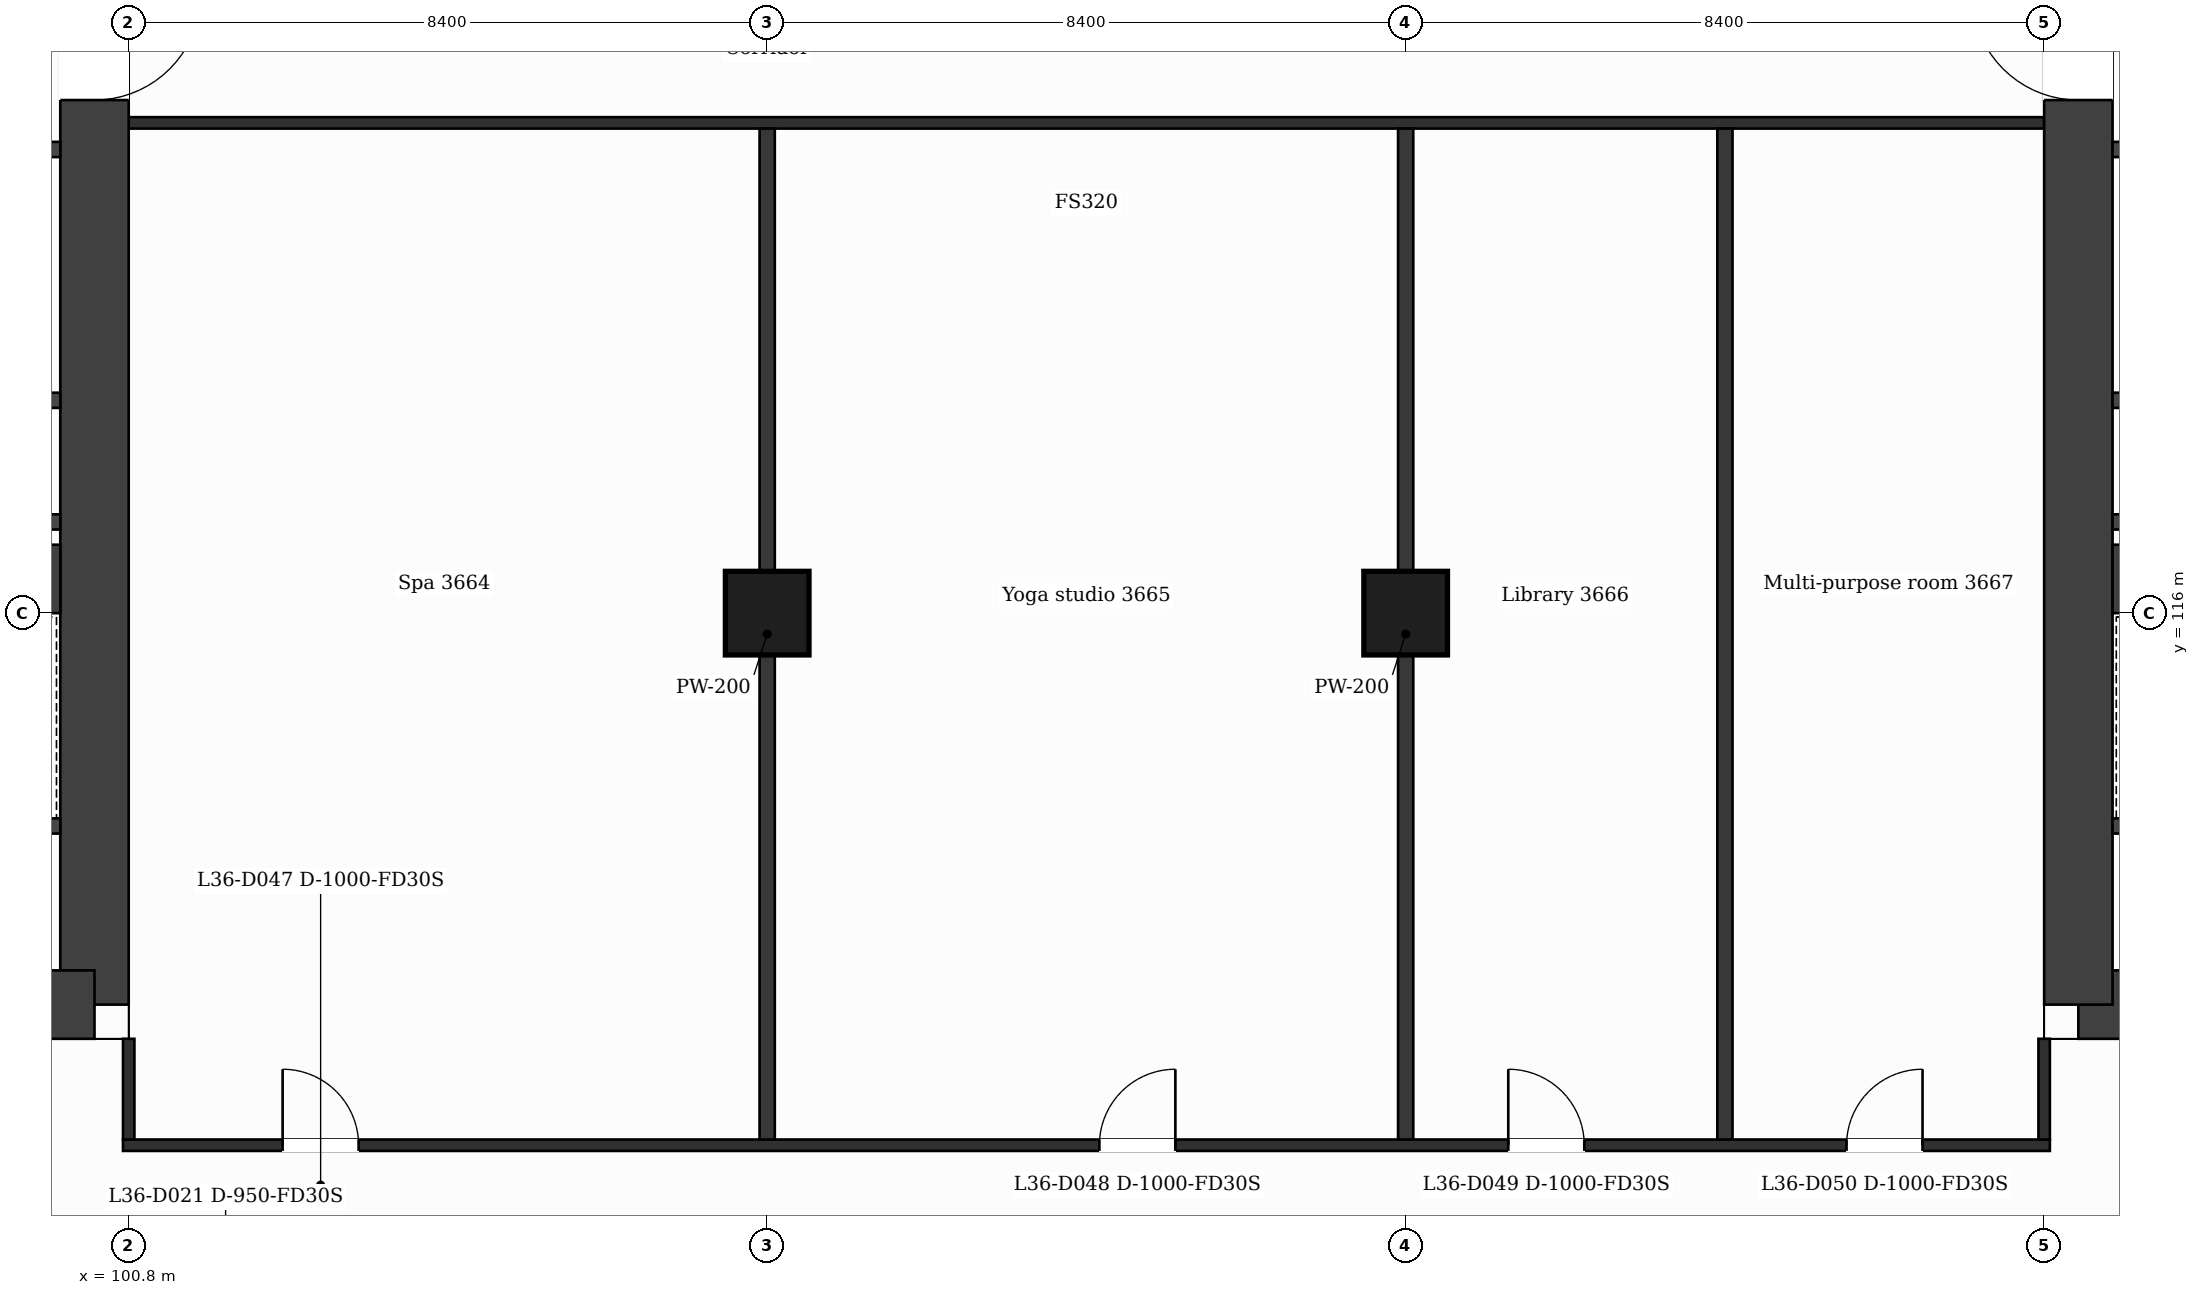
"""IFC4 building model, lengths in metres.
Left out: names, types, materials, properties, quantities, classifications, styles, units other than length and angle.
Written with IfcOpenShell. Run it as: python <this file> out.ifc"""

import sys

from ifc_helpers import new_model, si_unit, direction, frame, frame_2d, origin, origin_2d, place, context, subcontext, project, spatial, rectangle, extrude, element, fill, save


model = new_model("IFC4")
c1 = context("Model", 3, precision=1e-05, world=origin(), true_north=direction((0.0, 1.0)))
c2 = subcontext(c1, "Body", "Model", "MODEL_VIEW")
j1 = project(units=[si_unit("LENGTHUNIT", "METRE"), si_unit("PLANEANGLEUNIT", "RADIAN")], contexts=[c1])
p1 = place(None, origin())
s1 = spatial("IfcSite", under=j1, at=p1, CompositionType="ELEMENT")
p2 = place(p1, origin())
s2 = spatial("IfcBuilding", under=s1, at=p2, CompositionType="ELEMENT")
p3 = place(p2, frame((0.0, 0.0, 155.2)))
s3 = spatial("IfcBuildingStorey", under=s2, at=p3, CompositionType="ELEMENT", Elevation=155.2)
p4 = place(p3, frame((100.35, 131.95, 0.0), z_axis=(0.0, 0.0, 1.0), x_axis=(0.0, -1.0, 0.0)))
e1 = element("IfcWall", 1, at=p4, inside=s3, PredefinedType="SHEAR", context=c2, shape_type="SweptSolid", body=[
    extrude(rectangle(XDim=21.1, YDim=0.9, at=frame_2d((10.55, 0.0))), origin(), (0.0, 0.0, 1.0), 3.7),
])
p5 = place(p4, frame((7.8, 0.0, 0.0)))
e2 = element("IfcOpeningElement", 2, at=p5, cuts=e1, PredefinedType="OPENING", context=c2, shape_type="SweptSolid", body=[
    extrude(rectangle(XDim=1.4, YDim=2.1, at=frame_2d((0.7, 1.05))), frame((0.0, 0.46, 0.0), z_axis=(0.0, -1.0, 0.0), x_axis=(1.0, 0.0, 0.0)), (0.0, 0.0, 1.0), 0.92),
])
p6 = place(p3, frame((100.35, 110.85, 0.0), z_axis=(0.0, 0.0, 1.0), x_axis=(-1.0, 0.0, 0.0)))
e3 = element("IfcWall", 3, at=p6, inside=s3, PredefinedType="SHEAR", context=c2, shape_type="SweptSolid", body=[
    extrude(rectangle(XDim=14.166, YDim=0.9, at=frame_2d((7.083, 0.0))), origin(), (0.0, 0.0, 1.0), 3.7),
])
p7 = place(p6, frame((5.855, 0.0, 0.0)))
e4 = element("IfcOpeningElement", 4, at=p7, cuts=e3, PredefinedType="OPENING", context=c2, shape_type="SweptSolid", body=[
    extrude(rectangle(XDim=1.4, YDim=2.1, at=frame_2d((0.7, 1.05))), frame((0.0, 0.46, 0.0), z_axis=(0.0, -1.0, 0.0), x_axis=(1.0, 0.0, 0.0)), (0.0, 0.0, 1.0), 0.92),
])
p8 = place(p3, frame((94.8, 116.45, 0.0), z_axis=(0.0, 0.0, 1.0), x_axis=(1.0, 0.0, 0.0)))
e5 = element("IfcWall", 5, at=p8, inside=s3, PredefinedType="SHEAR", context=c2, shape_type="SweptSolid", body=[
    extrude(rectangle(XDim=5.1, YDim=0.9, at=frame_2d((2.55, 0.0))), origin(), (0.0, 0.0, 1.0), 3.7),
])
p9 = place(p3, frame((140.616, 110.85, 0.0), z_axis=(0.0, 0.0, 1.0), x_axis=(-1.0, 0.0, 0.0)))
e6 = element("IfcWall", 6, at=p9, inside=s3, PredefinedType="SHEAR", context=c2, shape_type="SweptSolid", body=[
    extrude(rectangle(XDim=14.166, YDim=0.9, at=frame_2d((7.083, 0.0))), origin(), (0.0, 0.0, 1.0), 3.7),
])
p10 = place(p9, frame((6.911, 0.0, 0.0)))
e7 = element("IfcOpeningElement", 7, at=p10, cuts=e6, PredefinedType="OPENING", context=c2, shape_type="SweptSolid", body=[
    extrude(rectangle(XDim=1.4, YDim=2.1, at=frame_2d((0.7, 1.05))), frame((0.0, 0.46, 0.0), z_axis=(0.0, -1.0, 0.0), x_axis=(1.0, 0.0, 0.0)), (0.0, 0.0, 1.0), 0.92),
])
p11 = place(p3, frame((126.45, 110.85, 0.0), z_axis=(0.0, 0.0, 1.0), x_axis=(0.0, 1.0, 0.0)))
e8 = element("IfcWall", 8, at=p11, inside=s3, PredefinedType="SHEAR", context=c2, shape_type="SweptSolid", body=[
    extrude(rectangle(XDim=21.1, YDim=0.9, at=frame_2d((10.55, 0.0))), origin(), (0.0, 0.0, 1.0), 3.7),
])
p12 = place(p11, frame((11.9, 0.0, 0.0)))
e9 = element("IfcOpeningElement", 9, at=p12, cuts=e8, PredefinedType="OPENING", context=c2, shape_type="SweptSolid", body=[
    extrude(rectangle(XDim=1.4, YDim=2.1, at=frame_2d((0.7, 1.05))), frame((0.0, 0.46, 0.0), z_axis=(0.0, -1.0, 0.0), x_axis=(1.0, 0.0, 0.0)), (0.0, 0.0, 1.0), 0.92),
])
p13 = place(p3, frame((126.9, 116.45, 0.0), z_axis=(0.0, 0.0, 1.0), x_axis=(1.0, 0.0, 0.0)))
e10 = element("IfcWall", 10, at=p13, inside=s3, PredefinedType="SHEAR", context=c2, shape_type="SweptSolid", body=[
    extrude(rectangle(XDim=5.1, YDim=0.9, at=frame_2d((2.55, 0.0))), origin(), (0.0, 0.0, 1.0), 3.7),
])
for number, where, z_axis, x_axis in (
    (11, (109.2, 116.0, 0.0), (0.0, 0.0, 1.0), (1.0, 0.0, 0.0)),
    (12, (117.6, 116.0, 0.0), (0.0, 0.0, 1.0), (1.0, 0.0, 0.0)),
):
    element("IfcColumn", number, at=place(p3, frame(where, z_axis=z_axis, x_axis=x_axis)), inside=s3, PredefinedType="COLUMN", context=c2, shape_type="SweptSolid", body=[
        extrude(rectangle(XDim=1.1, YDim=1.1, at=origin_2d()), origin(), (0.0, 0.0, 1.0), 3.7),
    ])
p14 = place(p3, frame((100.725, 109.0, 0.0), z_axis=(0.0, 0.0, 1.0), x_axis=(1.0, 0.0, 0.0)))
e13 = element("IfcWall", 13, at=p14, inside=s3, PredefinedType="PARTITIONING", context=c2, shape_type="SweptSolid", body=[
    extrude(rectangle(XDim=25.35, YDim=0.15, at=frame_2d((12.675, 0.0))), origin(), (0.0, 0.0, 1.0), 3.38),
])
p15 = place(p14, frame((2.1, 0.0, 0.0)))
e14 = element("IfcOpeningElement", 14, at=p15, cuts=e13, PredefinedType="OPENING", context=c2, shape_type="SweptSolid", body=[
    extrude(rectangle(XDim=1.0, YDim=2.1, at=frame_2d((0.5, 1.05))), frame((0.0, 0.085, 0.0), z_axis=(0.0, -1.0, 0.0), x_axis=(1.0, 0.0, 0.0)), (0.0, 0.0, 1.0), 0.17),
])
p16 = place(p14, frame((12.845, 0.0, 0.0)))
e15 = element("IfcOpeningElement", 15, at=p16, cuts=e13, PredefinedType="OPENING", context=c2, shape_type="SweptSolid", body=[
    extrude(rectangle(XDim=1.0, YDim=2.1, at=frame_2d((0.5, 1.05))), frame((0.0, 0.085, 0.0), z_axis=(0.0, -1.0, 0.0), x_axis=(1.0, 0.0, 0.0)), (0.0, 0.0, 1.0), 0.17),
])
p17 = place(p14, frame((18.225, 0.0, 0.0)))
e16 = element("IfcOpeningElement", 16, at=p17, cuts=e13, PredefinedType="OPENING", context=c2, shape_type="SweptSolid", body=[
    extrude(rectangle(XDim=1.0, YDim=2.1, at=frame_2d((0.5, 1.05))), frame((0.0, 0.085, 0.0), z_axis=(0.0, -1.0, 0.0), x_axis=(1.0, 0.0, 0.0)), (0.0, 0.0, 1.0), 0.17),
])
p18 = place(p14, frame((22.675, 0.0, 0.0)))
e17 = element("IfcOpeningElement", 17, at=p18, cuts=e13, PredefinedType="OPENING", context=c2, shape_type="SweptSolid", body=[
    extrude(rectangle(XDim=1.0, YDim=2.1, at=frame_2d((0.5, 1.05))), frame((0.0, 0.085, 0.0), z_axis=(0.0, -1.0, 0.0), x_axis=(1.0, 0.0, 0.0)), (0.0, 0.0, 1.0), 0.17),
])
p19 = place(p3, frame((95.127, 113.2, 0.0), z_axis=(0.0, 0.0, 1.0), x_axis=(1.0, 0.0, 0.0)))
e18 = element("IfcWall", 18, at=p19, inside=s3, PredefinedType="PARTITIONING", context=c2, shape_type="SweptSolid", body=[
    extrude(rectangle(XDim=4.773, YDim=0.2, at=frame_2d((2.386, 0.0))), origin(), (0.0, 0.0, 1.0), 3.38),
])
p20 = place(p19, frame((2.921, 0.0, 0.0)))
e19 = element("IfcOpeningElement", 19, at=p20, cuts=e18, PredefinedType="OPENING", context=c2, shape_type="SweptSolid", body=[
    extrude(rectangle(XDim=1.1, YDim=2.1, at=frame_2d((0.55, 1.05))), frame((0.0, 0.11, 0.0), z_axis=(0.0, -1.0, 0.0), x_axis=(1.0, 0.0, 0.0)), (0.0, 0.0, 1.0), 0.22),
])
p21 = place(p3, frame((126.9, 113.2, 0.0), z_axis=(0.0, 0.0, 1.0), x_axis=(1.0, 0.0, 0.0)))
e20 = element("IfcWall", 20, at=p21, inside=s3, PredefinedType="PARTITIONING", context=c2, shape_type="SweptSolid", body=[
    extrude(rectangle(XDim=4.773, YDim=0.2, at=frame_2d((2.387, 0.0))), origin(), (0.0, 0.0, 1.0), 3.38),
])
p22 = place(p21, frame((0.618, 0.0, 0.0)))
e21 = element("IfcOpeningElement", 21, at=p22, cuts=e20, PredefinedType="OPENING", context=c2, shape_type="SweptSolid", body=[
    extrude(rectangle(XDim=1.1, YDim=2.1, at=frame_2d((0.55, 1.05))), frame((0.0, 0.11, 0.0), z_axis=(0.0, -1.0, 0.0), x_axis=(1.0, 0.0, 0.0)), (0.0, 0.0, 1.0), 0.22),
])
p23 = place(p3, frame((95.227, 117.2, 0.0), z_axis=(0.0, 0.0, 1.0), x_axis=(1.0, 0.0, 0.0)))
e22 = element("IfcWall", 22, at=p23, inside=s3, PredefinedType="PARTITIONING", context=c2, shape_type="SweptSolid", body=[
    extrude(rectangle(XDim=4.673, YDim=0.2, at=frame_2d((2.336, 0.0))), origin(), (0.0, 0.0, 1.0), 3.38),
])
p24 = place(p3, frame((126.9, 117.2, 0.0), z_axis=(0.0, 0.0, 1.0), x_axis=(1.0, 0.0, 0.0)))
e23 = element("IfcWall", 23, at=p24, inside=s3, PredefinedType="PARTITIONING", context=c2, shape_type="SweptSolid", body=[
    extrude(rectangle(XDim=4.673, YDim=0.2, at=frame_2d((2.336, 0.0))), origin(), (0.0, 0.0, 1.0), 3.38),
])
p25 = place(p3, frame((95.227, 118.8, 0.0), z_axis=(0.0, 0.0, 1.0), x_axis=(1.0, 0.0, 0.0)))
e24 = element("IfcWall", 24, at=p25, inside=s3, PredefinedType="PARTITIONING", context=c2, shape_type="SweptSolid", body=[
    extrude(rectangle(XDim=4.673, YDim=0.2, at=frame_2d((2.336, 0.0))), origin(), (0.0, 0.0, 1.0), 3.38),
])
p26 = place(p3, frame((126.9, 118.8, 0.0), z_axis=(0.0, 0.0, 1.0), x_axis=(1.0, 0.0, 0.0)))
e25 = element("IfcWall", 25, at=p26, inside=s3, PredefinedType="PARTITIONING", context=c2, shape_type="SweptSolid", body=[
    extrude(rectangle(XDim=4.673, YDim=0.2, at=frame_2d((2.336, 0.0))), origin(), (0.0, 0.0, 1.0), 3.38),
])
p27 = place(p3, frame((95.227, 122.1, 0.0), z_axis=(0.0, 0.0, 1.0), x_axis=(1.0, 0.0, 0.0)))
e26 = element("IfcWall", 26, at=p27, inside=s3, PredefinedType="PARTITIONING", context=c2, shape_type="SweptSolid", body=[
    extrude(rectangle(XDim=4.673, YDim=0.2, at=frame_2d((2.336, 0.0))), origin(), (0.0, 0.0, 1.0), 3.38),
])
p28 = place(p27, frame((0.718, 0.0, 0.0)))
e27 = element("IfcOpeningElement", 27, at=p28, cuts=e26, PredefinedType="OPENING", context=c2, shape_type="SweptSolid", body=[
    extrude(rectangle(XDim=0.9, YDim=2.1, at=frame_2d((0.45, 1.05))), frame((0.0, 0.11, 0.0), z_axis=(0.0, -1.0, 0.0), x_axis=(1.0, 0.0, 0.0)), (0.0, 0.0, 1.0), 0.22),
])
p29 = place(p27, frame((3.055, 0.0, 0.0)))
e28 = element("IfcOpeningElement", 28, at=p29, cuts=e26, PredefinedType="OPENING", context=c2, shape_type="SweptSolid", body=[
    extrude(rectangle(XDim=0.9, YDim=2.1, at=frame_2d((0.45, 1.05))), frame((0.0, 0.11, 0.0), z_axis=(0.0, -1.0, 0.0), x_axis=(1.0, 0.0, 0.0)), (0.0, 0.0, 1.0), 0.22),
])
p30 = place(p3, frame((126.9, 122.1, 0.0), z_axis=(0.0, 0.0, 1.0), x_axis=(1.0, 0.0, 0.0)))
e29 = element("IfcWall", 29, at=p30, inside=s3, PredefinedType="PARTITIONING", context=c2, shape_type="SweptSolid", body=[
    extrude(rectangle(XDim=4.673, YDim=0.2, at=frame_2d((2.336, 0.0))), origin(), (0.0, 0.0, 1.0), 3.38),
])
p31 = place(p30, frame((3.128, 0.0, 0.0)))
e30 = element("IfcOpeningElement", 30, at=p31, cuts=e29, PredefinedType="OPENING", context=c2, shape_type="SweptSolid", body=[
    extrude(rectangle(XDim=0.9, YDim=2.1, at=frame_2d((0.45, 1.05))), frame((0.0, 0.11, 0.0), z_axis=(0.0, -1.0, 0.0), x_axis=(1.0, 0.0, 0.0)), (0.0, 0.0, 1.0), 0.22),
])
p32 = place(p30, frame((0.902, 0.0, 0.0)))
e31 = element("IfcOpeningElement", 31, at=p32, cuts=e29, PredefinedType="OPENING", context=c2, shape_type="SweptSolid", body=[
    extrude(rectangle(XDim=0.9, YDim=2.1, at=frame_2d((0.45, 1.05))), frame((0.0, 0.11, 0.0), z_axis=(0.0, -1.0, 0.0), x_axis=(1.0, 0.0, 0.0)), (0.0, 0.0, 1.0), 0.22),
])
p33 = place(p3, frame((100.8, 122.45, 0.0), z_axis=(0.0, 0.0, 1.0), x_axis=(1.0, 0.0, 0.0)))
e32 = element("IfcWall", 32, at=p33, inside=s3, PredefinedType="PARTITIONING", context=c2, shape_type="SweptSolid", body=[
    extrude(rectangle(XDim=25.2, YDim=0.15, at=frame_2d((12.6, 0.0))), origin(), (0.0, 0.0, 1.0), 3.38),
])
p34 = place(p3, frame((100.8, 109.075, 0.0), z_axis=(0.0, 0.0, 1.0), x_axis=(0.0, 1.0, 0.0)))
e33 = element("IfcWall", 33, at=p34, inside=s3, PredefinedType="PARTITIONING", context=c2, shape_type="SweptSolid", body=[
    extrude(rectangle(XDim=1.325, YDim=0.15, at=frame_2d((0.663, 0.0))), origin(), (0.0, 0.0, 1.0), 3.38),
])
for number, where, z_axis, x_axis in (
    (34, (109.2, 109.075, 0.0), (0.0, 0.0, 1.0), (0.0, 1.0, 0.0)),
    (35, (117.6, 109.075, 0.0), (0.0, 0.0, 1.0), (0.0, 1.0, 0.0)),
    (36, (121.8, 109.075, 0.0), (0.0, 0.0, 1.0), (0.0, 1.0, 0.0)),
):
    element("IfcWall", number, at=place(p3, frame(where, z_axis=z_axis, x_axis=x_axis)), inside=s3, PredefinedType="PARTITIONING", context=c2, shape_type="SweptSolid", body=[
        extrude(rectangle(XDim=13.3, YDim=0.2, at=frame_2d((6.65, 0.0))), origin(), (0.0, 0.0, 1.0), 3.38),
    ])
p35 = place(p3, frame((126.0, 109.075, 0.0), z_axis=(0.0, 0.0, 1.0), x_axis=(0.0, 1.0, 0.0)))
e37 = element("IfcWall", 37, at=p35, inside=s3, PredefinedType="PARTITIONING", context=c2, shape_type="SweptSolid", body=[
    extrude(rectangle(XDim=1.325, YDim=0.15, at=frame_2d((0.663, 0.0))), origin(), (0.0, 0.0, 1.0), 3.38),
])
p36 = place(p15, origin())
e38 = element("IfcDoor", 38, at=p36, inside=s3, OperationType="SINGLE_SWING_LEFT", PredefinedType="DOOR", context=c2, shape_type="SweptSolid", body=[
    extrude(rectangle(XDim=1.0, YDim=2.1, at=frame_2d((0.5, 1.05))), frame((0.0, 0.025, 0.0), z_axis=(0.0, -1.0, 0.0), x_axis=(1.0, 0.0, 0.0)), (0.0, 0.0, 1.0), 0.05),
])
fill(e14, e38)
p37 = place(p16, origin())
e39 = element("IfcDoor", 39, at=p37, inside=s3, OperationType="SINGLE_SWING_RIGHT", PredefinedType="DOOR", context=c2, shape_type="SweptSolid", body=[
    extrude(rectangle(XDim=1.0, YDim=2.1, at=frame_2d((0.5, 1.05))), frame((0.0, 0.025, 0.0), z_axis=(0.0, -1.0, 0.0), x_axis=(1.0, 0.0, 0.0)), (0.0, 0.0, 1.0), 0.05),
])
fill(e15, e39)
p38 = place(p17, origin())
e40 = element("IfcDoor", 40, at=p38, inside=s3, OperationType="SINGLE_SWING_LEFT", PredefinedType="DOOR", context=c2, shape_type="SweptSolid", body=[
    extrude(rectangle(XDim=1.0, YDim=2.1, at=frame_2d((0.5, 1.05))), frame((0.0, 0.025, 0.0), z_axis=(0.0, -1.0, 0.0), x_axis=(1.0, 0.0, 0.0)), (0.0, 0.0, 1.0), 0.05),
])
fill(e16, e40)
p39 = place(p18, origin())
e41 = element("IfcDoor", 41, at=p39, inside=s3, OperationType="SINGLE_SWING_RIGHT", PredefinedType="DOOR", context=c2, shape_type="SweptSolid", body=[
    extrude(rectangle(XDim=1.0, YDim=2.1, at=frame_2d((0.5, 1.05))), frame((0.0, 0.025, 0.0), z_axis=(0.0, -1.0, 0.0), x_axis=(1.0, 0.0, 0.0)), (0.0, 0.0, 1.0), 0.05),
])
fill(e17, e41)
p40 = place(p5, origin())
e42 = element("IfcDoor", 42, at=p40, inside=s3, OperationType="SINGLE_SWING_LEFT", PredefinedType="DOOR", context=c2, shape_type="SweptSolid", body=[
    extrude(rectangle(XDim=1.4, YDim=2.1, at=frame_2d((0.7, 1.05))), frame((0.0, 0.025, 0.0), z_axis=(0.0, -1.0, 0.0), x_axis=(1.0, 0.0, 0.0)), (0.0, 0.0, 1.0), 0.05),
])
fill(e2, e42)
p41 = place(p12, origin())
e43 = element("IfcDoor", 43, at=p41, inside=s3, OperationType="SINGLE_SWING_RIGHT", PredefinedType="DOOR", context=c2, shape_type="SweptSolid", body=[
    extrude(rectangle(XDim=1.4, YDim=2.1, at=frame_2d((0.7, 1.05))), frame((0.0, 0.025, 0.0), z_axis=(0.0, -1.0, 0.0), x_axis=(1.0, 0.0, 0.0)), (0.0, 0.0, 1.0), 0.05),
])
fill(e9, e43)
save(model, sys.argv[1])
